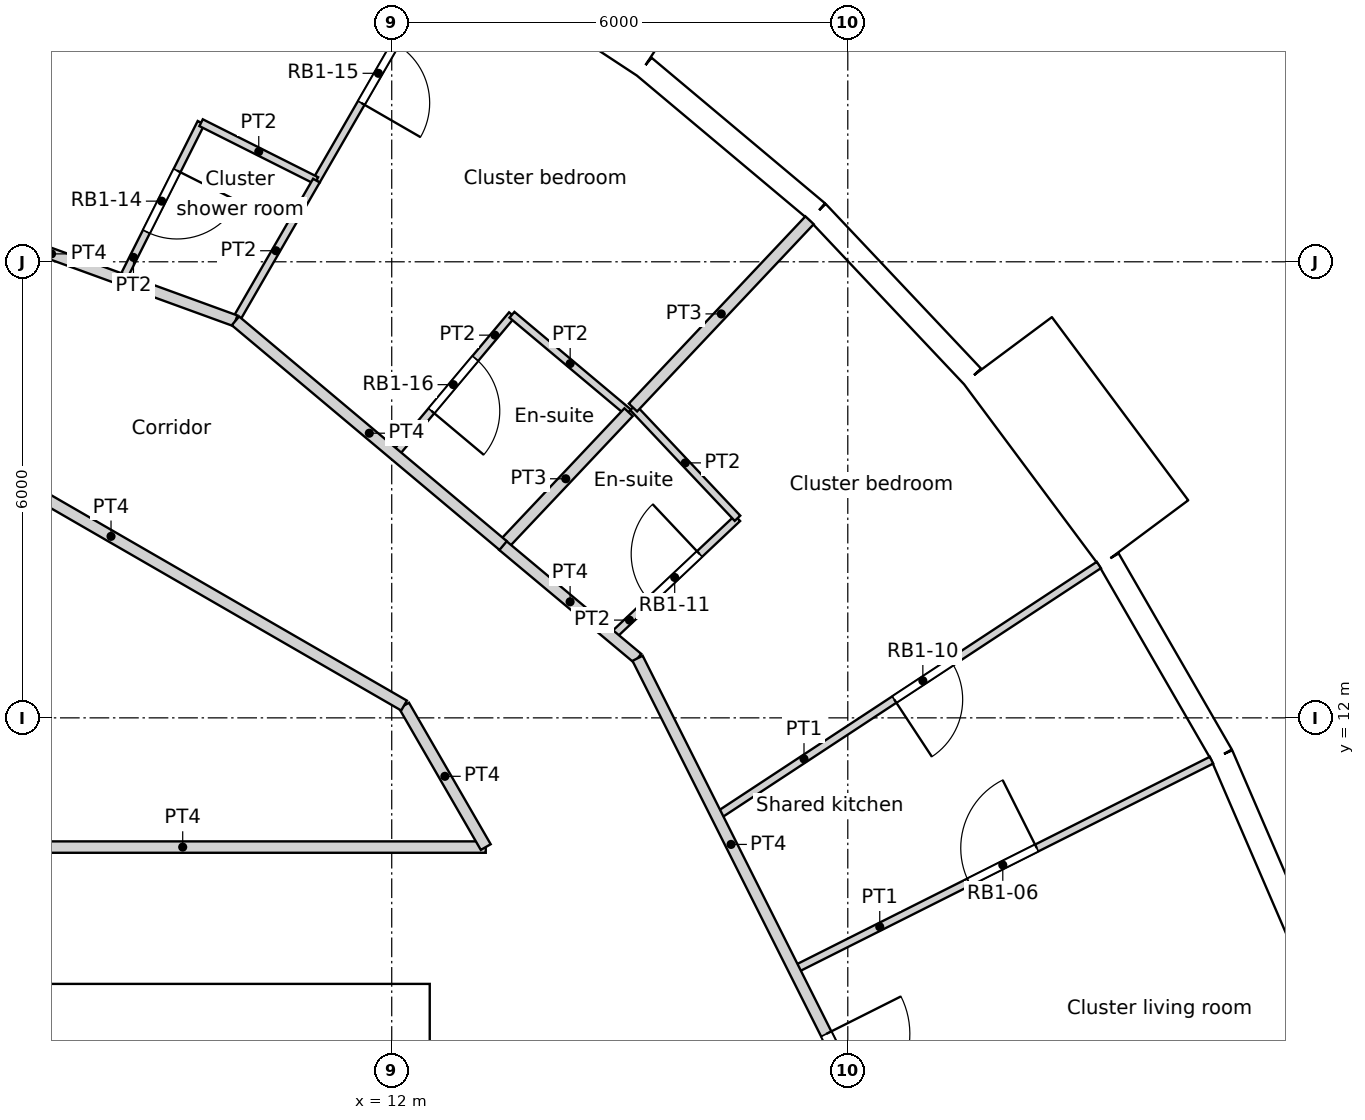
"""IFC4 building model, lengths in metres.
Left out: names, types, materials, properties, quantities, classifications, styles, units other than length and angle.
Written with IfcOpenShell. Run it as: python <this file> out.ifc"""

import sys

from ifc_helpers import new_model, si_unit, direction, frame, frame_2d, origin, origin_2d, place, context, subcontext, project, spatial, rectangle, circle, extrude, element, fill, save


model = new_model("IFC4")
c1 = context("Model", 3, precision=1e-05, world=origin(), true_north=direction((0.0, 1.0)))
c2 = subcontext(c1, "Body", "Model", "MODEL_VIEW")
j1 = project(units=[si_unit("LENGTHUNIT", "METRE"), si_unit("PLANEANGLEUNIT", "RADIAN")], contexts=[c1])
p1 = place(None, origin())
s1 = spatial("IfcSite", under=j1, at=p1, CompositionType="ELEMENT")
p2 = place(p1, origin())
s2 = spatial("IfcBuilding", under=s1, at=p2, CompositionType="ELEMENT")
p3 = place(p2, frame((0.0, 0.0, 126.0)))
s3 = spatial("IfcBuildingStorey", under=s2, at=p3, CompositionType="ELEMENT", Elevation=126.0)
for number, where, z_axis, x_axis in (
    (1, (21.937, 11.017, 0.0), (0.0, 0.0, 1.0), (1.0, 0.0, 0.0)),
    (2, (18.805, 15.779, 0.0), (0.0, 0.0, 1.0), (1.0, 0.0, 0.0)),
    (3, (14.659, 19.69, 0.0), (0.0, 0.0, 1.0), (1.0, 0.0, 0.0)),
):
    element("IfcColumn", number, at=place(p3, frame(where, z_axis=z_axis, x_axis=x_axis)), inside=s3, PredefinedType="COLUMN", context=c2, shape_type="SweptSolid", body=[
        extrude(circle(Radius=0.6, at=origin_2d()), origin(), (0.0, 0.0, 1.0), 3.6),
    ])
for number, where, z_axis, x_axis in (
    (4, (15.552, 10.603, 0.0), (0.0, 0.0, 1.0), (1.0, 0.0, 0.0)),
    (5, (11.735, 14.716, 0.0), (0.0, 0.0, 1.0), (1.0, 0.0, 0.0)),
):
    element("IfcColumn", number, at=place(p3, frame(where, z_axis=z_axis, x_axis=x_axis)), inside=s3, PredefinedType="COLUMN", context=c2, shape_type="SweptSolid", body=[
        extrude(circle(Radius=0.65, at=origin_2d()), origin(), (0.0, 0.0, 1.0), 3.6),
    ])
p4 = place(p3, frame((24.097, 8.781, 0.0), z_axis=(0.0, 0.0, 1.0), x_axis=(-0.396078892785, 0.918216483565, 0.0)))
e6 = element("IfcWall", 6, at=p4, inside=s3, PredefinedType="SOLIDWALL", context=c2, shape_type="SweptSolid", body=[
    extrude(rectangle(XDim=2.973, YDim=0.3, at=frame_2d((1.486, 0.0))), origin(), (0.0, 0.0, 1.0), 3.3),
])
p5 = place(p4, frame((1.486, 0.0, 1.55)))
e7 = element("IfcOpeningElement", 7, at=p5, cuts=e6, PredefinedType="OPENING", context=c2, shape_type="SweptSolid", body=[
    extrude(circle(Radius=0.9, at=origin_2d()), frame((0.0, 0.16, 0.0), z_axis=(0.0, -1.0, 0.0), x_axis=(1.0, 0.0, 0.0)), (0.0, 0.0, 1.0), 0.32),
])
p6 = place(p3, frame((22.919, 11.51, 0.0), z_axis=(0.0, 0.0, 1.0), x_axis=(-0.500016263033, 0.866016014115, 0.0)))
e8 = element("IfcWall", 8, at=p6, inside=s3, PredefinedType="SOLIDWALL", context=c2, shape_type="SweptSolid", body=[
    extrude(rectangle(XDim=2.973, YDim=0.3, at=frame_2d((1.487, 0.0))), origin(), (0.0, 0.0, 1.0), 3.3),
])
p7 = place(p6, frame((1.486, 0.0, 1.55)))
e9 = element("IfcOpeningElement", 9, at=p7, cuts=e8, PredefinedType="OPENING", context=c2, shape_type="SweptSolid", body=[
    extrude(circle(Radius=0.9, at=origin_2d()), frame((0.0, 0.16, 0.0), z_axis=(0.0, -1.0, 0.0), x_axis=(1.0, 0.0, 0.0)), (0.0, 0.0, 1.0), 0.32),
])
p8 = place(p3, frame((21.895, 14.43, -0.3), z_axis=(0.0, 0.0, 1.0), x_axis=(-0.597183717734, 0.802104486506, 0.0)))
e10 = element("IfcWall", 10, at=p8, inside=s3, PredefinedType="ELEMENTEDWALL", context=c2, shape_type="SweptSolid", body=[
    extrude(rectangle(XDim=3.0, YDim=1.45, at=frame_2d((1.5, 0.0))), origin(), (0.0, 0.0, 1.0), 3.6),
])
p9 = place(p8, frame((1.5, 0.0, 1.85)))
e11 = element("IfcOpeningElement", 11, at=p9, cuts=e10, PredefinedType="OPENING", context=c2, shape_type="SweptSolid", body=[
    extrude(circle(Radius=0.9, at=origin_2d()), frame((0.0, 0.735, 0.0), z_axis=(0.0, -1.0, 0.0), x_axis=(1.0, 0.0, 0.0)), (0.0, 0.0, 1.0), 1.47),
])
p10 = place(p3, frame((19.64, 16.493, 0.0), z_axis=(0.0, 0.0, 1.0), x_axis=(-0.686235184166, 0.727379730273, 0.0)))
e12 = element("IfcWall", 12, at=p10, inside=s3, PredefinedType="SOLIDWALL", context=c2, shape_type="SweptSolid", body=[
    extrude(rectangle(XDim=2.973, YDim=0.3, at=frame_2d((1.486, 0.0))), origin(), (0.0, 0.0, 1.0), 3.3),
])
p11 = place(p10, frame((1.486, 0.0, 1.55)))
e13 = element("IfcOpeningElement", 13, at=p11, cuts=e12, PredefinedType="OPENING", context=c2, shape_type="SweptSolid", body=[
    extrude(circle(Radius=0.9, at=origin_2d()), frame((0.0, 0.16, 0.0), z_axis=(0.0, -1.0, 0.0), x_axis=(1.0, 0.0, 0.0)), (0.0, 0.0, 1.0), 0.32),
])
p12 = place(p3, frame((17.6, 18.655, 0.0), z_axis=(0.0, 0.0, 1.0), x_axis=(-0.766049350637, 0.642781761089, 0.0)))
e14 = element("IfcWall", 14, at=p12, inside=s3, PredefinedType="SOLIDWALL", context=c2, shape_type="SweptSolid", body=[
    extrude(rectangle(XDim=2.973, YDim=0.3, at=frame_2d((1.486, 0.0))), origin(), (0.0, 0.0, 1.0), 3.3),
])
p13 = place(p12, frame((1.486, 0.0, 1.55)))
e15 = element("IfcOpeningElement", 15, at=p13, cuts=e14, PredefinedType="OPENING", context=c2, shape_type="SweptSolid", body=[
    extrude(circle(Radius=0.9, at=origin_2d()), frame((0.0, 0.16, 0.0), z_axis=(0.0, -1.0, 0.0), x_axis=(1.0, 0.0, 0.0)), (0.0, 0.0, 1.0), 0.32),
])
p14 = place(p3, frame((15.639, 21.048, -0.3), z_axis=(0.0, 0.0, 1.0), x_axis=(-0.835514416706, 0.549468524554, 0.0)))
e16 = element("IfcWall", 16, at=p14, inside=s3, PredefinedType="ELEMENTEDWALL", context=c2, shape_type="SweptSolid", body=[
    extrude(rectangle(XDim=3.0, YDim=1.45, at=frame_2d((1.5, 0.0))), origin(), (0.0, 0.0, 1.0), 3.6),
])
p15 = place(p14, frame((1.5, 0.0, 1.85)))
e17 = element("IfcOpeningElement", 17, at=p15, cuts=e16, PredefinedType="OPENING", context=c2, shape_type="SweptSolid", body=[
    extrude(circle(Radius=0.9, at=origin_2d()), frame((0.0, 0.735, 0.0), z_axis=(0.0, -1.0, 0.0), x_axis=(1.0, 0.0, 0.0)), (0.0, 0.0, 1.0), 1.47),
])
p16 = place(p3, frame((24.677, 19.415, 0.0), z_axis=(0.0, 0.0, 1.0), x_axis=(-0.654818024412, 0.755786580263, 0.0)))
e18 = element("IfcWall", 18, at=p16, inside=s3, PredefinedType="PARAPET", context=c2, shape_type="SweptSolid", body=[
    extrude(rectangle(XDim=2.974, YDim=0.25, at=frame_2d((1.487, 0.0))), origin(), (0.0, 0.0, 1.0), 1.1),
])
p17 = place(p3, frame((-12.5, 8.05, 0.0), z_axis=(0.0, 0.0, 1.0), x_axis=(1.0, 0.0, 0.0)))
e19 = element("IfcWall", 19, at=p17, inside=s3, PredefinedType="SOLIDWALL", context=c2, shape_type="SweptSolid", body=[
    extrude(rectangle(XDim=25.0, YDim=0.9, at=frame_2d((12.5, 0.0))), origin(), (0.0, 0.0, 1.0), 3.6),
])
p18 = place(p17, frame((8.3, 0.0, 0.0)))
e20 = element("IfcOpeningElement", 20, at=p18, cuts=e19, PredefinedType="OPENING", context=c2, shape_type="SweptSolid", body=[
    extrude(rectangle(XDim=1.8, YDim=2.1, at=frame_2d((0.9, 1.05))), frame((0.0, 0.45, 0.0), z_axis=(0.0, -1.0, 0.0), x_axis=(1.0, 0.0, 0.0)), (0.0, 0.0, 1.0), 0.9),
])
p19 = place(p3, frame((-3.025, 10.3, 0.0), z_axis=(0.0, 0.0, 1.0), x_axis=(1.0, 0.0, 0.0)))
e21 = element("IfcWall", 21, at=p19, inside=s3, PredefinedType="PARTITIONING", context=c2, shape_type="SweptSolid", body=[
    extrude(rectangle(XDim=16.262, YDim=0.15, at=frame_2d((8.131, 0.0))), origin(), (0.0, 0.0, 1.0), 3.3),
])
p20 = place(p19, frame((7.288, 0.0, 0.0)))
e22 = element("IfcOpeningElement", 22, at=p20, cuts=e21, PredefinedType="OPENING", context=c2, shape_type="SweptSolid", body=[
    extrude(rectangle(XDim=0.95, YDim=2.1, at=frame_2d((0.475, 1.05))), frame((0.0, 0.075, 0.0), z_axis=(0.0, -1.0, 0.0), x_axis=(1.0, 0.0, 0.0)), (0.0, 0.0, 1.0), 0.15),
])
p21 = place(p3, frame((12.162, 12.162, 0.0), z_axis=(0.0, 0.0, 1.0), x_axis=(0.499961633463, -0.866047553582, 0.0)))
e23 = element("IfcWall", 23, at=p21, inside=s3, PredefinedType="PARTITIONING", context=c2, shape_type="SweptSolid", body=[
    extrude(rectangle(XDim=2.15, YDim=0.15, at=frame_2d((1.075, 0.0))), origin(), (0.0, 0.0, 1.0), 3.3),
])
p22 = place(p3, frame((15.235, 12.784, 0.0), z_axis=(0.0, 0.0, 1.0), x_axis=(0.448809691484, -0.893627361281, 0.0)))
e24 = element("IfcWall", 24, at=p22, inside=s3, PredefinedType="PARTITIONING", context=c2, shape_type="SweptSolid", body=[
    extrude(rectangle(XDim=9.174, YDim=0.15, at=frame_2d((4.587, 0.0))), origin(), (0.0, 0.0, 1.0), 3.3),
])
p23 = place(p22, frame((5.53, 0.0, 0.0)))
e25 = element("IfcOpeningElement", 25, at=p23, cuts=e24, PredefinedType="OPENING", context=c2, shape_type="SweptSolid", body=[
    extrude(rectangle(XDim=1.1, YDim=2.1, at=frame_2d((0.55, 1.05))), frame((0.0, 0.075, 0.0), z_axis=(0.0, -1.0, 0.0), x_axis=(1.0, 0.0, 0.0)), (0.0, 0.0, 1.0), 0.15),
])
p24 = place(p3, frame((13.458, 14.27, 0.0), z_axis=(0.0, 0.0, 1.0), x_axis=(0.767079699321, -0.641551817775, 0.0)))
e26 = element("IfcWall", 26, at=p24, inside=s3, PredefinedType="PARTITIONING", context=c2, shape_type="SweptSolid", body=[
    extrude(rectangle(XDim=2.316, YDim=0.15, at=frame_2d((1.158, 0.0))), origin(), (0.0, 0.0, 1.0), 3.3),
])
p25 = place(p3, frame((4.452, 16.614, 0.0), z_axis=(0.0, 0.0, 1.0), x_axis=(0.866005203721, -0.500034985904, 0.0)))
e27 = element("IfcWall", 27, at=p25, inside=s3, PredefinedType="PARTITIONING", context=c2, shape_type="SweptSolid", body=[
    extrude(rectangle(XDim=8.903, YDim=0.15, at=frame_2d((4.452, 0.0))), origin(), (0.0, 0.0, 1.0), 3.3),
])
p26 = place(p3, frame((3.453, 19.586, 0.0), z_axis=(0.0, 0.0, 1.0), x_axis=(0.939706711967, -0.341981425643, 0.0)))
e28 = element("IfcWall", 28, at=p26, inside=s3, PredefinedType="PARTITIONING", context=c2, shape_type="SweptSolid", body=[
    extrude(rectangle(XDim=6.908, YDim=0.15, at=frame_2d((3.454, 0.0))), origin(), (0.0, 0.0, 1.0), 3.3),
])
p27 = place(p26, frame((0.608, 0.0, 0.0)))
e29 = element("IfcOpeningElement", 29, at=p27, cuts=e28, PredefinedType="OPENING", context=c2, shape_type="SweptSolid", body=[
    extrude(rectangle(XDim=1.1, YDim=2.1, at=frame_2d((0.55, 1.05))), frame((0.0, 0.075, 0.0), z_axis=(0.0, -1.0, 0.0), x_axis=(1.0, 0.0, 0.0)), (0.0, 0.0, 1.0), 0.15),
])
p28 = place(p3, frame((9.944, 17.223, 0.0), z_axis=(0.0, 0.0, 1.0), x_axis=(0.765940168638, -0.642911858708, 0.0)))
e30 = element("IfcWall", 30, at=p28, inside=s3, PredefinedType="PARTITIONING", context=c2, shape_type="SweptSolid", body=[
    extrude(rectangle(XDim=4.598, YDim=0.15, at=frame_2d((2.299, 0.0))), origin(), (0.0, 0.0, 1.0), 3.3),
])
p29 = place(p3, frame((17.293, 8.685, 0.0), z_axis=(0.0, 0.0, 1.0), x_axis=(0.893639230217, 0.448786058403, 0.0)))
e31 = element("IfcWall", 31, at=p29, inside=s3, PredefinedType="PARTITIONING", context=c2, shape_type="SweptSolid", body=[
    extrude(rectangle(XDim=6.146, YDim=0.1, at=frame_2d((3.073, 0.0))), origin(), (0.0, 0.0, 1.0), 3.3),
])
p30 = place(p29, frame((2.573, 0.0, 0.0)))
e32 = element("IfcOpeningElement", 32, at=p30, cuts=e31, PredefinedType="OPENING", context=c2, shape_type="SweptSolid", body=[
    extrude(rectangle(XDim=1.0, YDim=2.04, at=frame_2d((0.5, 1.02))), frame((0.0, 0.05, 0.0), z_axis=(0.0, -1.0, 0.0), x_axis=(1.0, 0.0, 0.0)), (0.0, 0.0, 1.0), 0.1),
])
p31 = place(p3, frame((16.278, 10.706, 0.0), z_axis=(0.0, 0.0, 1.0), x_axis=(0.835487706207, 0.549509138029, 0.0)))
e33 = element("IfcWall", 33, at=p31, inside=s3, PredefinedType="PARTITIONING", context=c2, shape_type="SweptSolid", body=[
    extrude(rectangle(XDim=6.014, YDim=0.1, at=frame_2d((3.007, 0.0))), origin(), (0.0, 0.0, 1.0), 3.3),
])
p32 = place(p31, frame((2.793, 0.0, 0.0)))
e34 = element("IfcOpeningElement", 34, at=p32, cuts=e33, PredefinedType="OPENING", context=c2, shape_type="SweptSolid", body=[
    extrude(rectangle(XDim=0.9, YDim=2.1, at=frame_2d((0.45, 1.05))), frame((0.0, 0.05, 0.0), z_axis=(0.0, -1.0, 0.0), x_axis=(1.0, 0.0, 0.0)), (0.0, 0.0, 1.0), 0.1),
])
p33 = place(p3, frame((14.896, 13.068, 0.0), z_axis=(0.0, 0.0, 1.0), x_axis=(0.727754926423, 0.68583727448, 0.0)))
e35 = element("IfcWall", 35, at=p33, inside=s3, PredefinedType="PARTITIONING", context=c2, shape_type="SweptSolid", body=[
    extrude(rectangle(XDim=2.271, YDim=0.1, at=frame_2d((1.136, 0.0))), origin(), (0.0, 0.0, 1.0), 3.3),
])
p34 = place(p33, frame((0.686, 0.0, 0.0)))
e36 = element("IfcOpeningElement", 36, at=p34, cuts=e35, PredefinedType="OPENING", context=c2, shape_type="SweptSolid", body=[
    extrude(rectangle(XDim=0.9, YDim=2.04, at=frame_2d((0.45, 1.02))), frame((0.0, 0.05, 0.0), z_axis=(0.0, -1.0, 0.0), x_axis=(1.0, 0.0, 0.0)), (0.0, 0.0, 1.0), 0.1),
])
p35 = place(p3, frame((15.174, 16.083, 0.0), z_axis=(0.0, 0.0, 1.0), x_axis=(0.686337209023, -0.727283462971, 0.0)))
e37 = element("IfcWall", 37, at=p35, inside=s3, PredefinedType="PARTITIONING", context=c2, shape_type="SweptSolid", body=[
    extrude(rectangle(XDim=2.003, YDim=0.1, at=frame_2d((1.002, 0.0))), origin(), (0.0, 0.0, 1.0), 3.3),
])
p36 = place(p3, frame((15.174, 16.083, 0.0), z_axis=(0.0, 0.0, 1.0), x_axis=(0.686144834043, 0.727464959099, 0.0)))
e38 = element("IfcWall", 38, at=p36, inside=s3, PredefinedType="PARTITIONING", context=c2, shape_type="SweptSolid", body=[
    extrude(rectangle(XDim=3.385, YDim=0.15, at=frame_2d((1.693, 0.0))), origin(), (0.0, 0.0, 1.0), 3.3),
])
p37 = place(p3, frame((13.463, 14.27, 0.0), z_axis=(0.0, 0.0, 1.0), x_axis=(0.686486574862, 0.727142477465, 0.0)))
e39 = element("IfcWall", 39, at=p37, inside=s3, PredefinedType="PARTITIONING", context=c2, shape_type="SweptSolid", body=[
    extrude(rectangle(XDim=2.408, YDim=0.15, at=frame_2d((1.204, 0.0))), origin(), (0.0, 0.0, 1.0), 3.3),
])
p38 = place(p3, frame((9.492, 19.83, 0.0), z_axis=(0.0, 0.0, 1.0), x_axis=(0.893620418257, -0.44882351551, 0.0)))
e40 = element("IfcWall", 40, at=p38, inside=s3, PredefinedType="PARTITIONING", context=c2, shape_type="SweptSolid", body=[
    extrude(rectangle(XDim=1.698, YDim=0.1, at=frame_2d((0.849, 0.0))), origin(), (0.0, 0.0, 1.0), 3.3),
])
p39 = place(p3, frame((8.455, 17.765, 0.0), z_axis=(0.0, 0.0, 1.0), x_axis=(0.448692072555, 0.893686423768, 0.0)))
e41 = element("IfcWall", 41, at=p39, inside=s3, PredefinedType="PARTITIONING", context=c2, shape_type="SweptSolid", body=[
    extrude(rectangle(XDim=2.311, YDim=0.1, at=frame_2d((1.155, 0.0))), origin(), (0.0, 0.0, 1.0), 3.3),
])
p40 = place(p39, frame((0.706, 0.0, 0.0)))
e42 = element("IfcOpeningElement", 42, at=p40, cuts=e41, PredefinedType="OPENING", context=c2, shape_type="SweptSolid", body=[
    extrude(rectangle(XDim=0.9, YDim=2.0, at=frame_2d((0.45, 1.0))), frame((0.0, 0.05, 0.0), z_axis=(0.0, -1.0, 0.0), x_axis=(1.0, 0.0, 0.0)), (0.0, 0.0, 1.0), 0.1),
])
p41 = place(p3, frame((11.009, 19.068, 0.0), z_axis=(0.0, 0.0, 1.0), x_axis=(0.500101058546, 0.865967049743, 0.0)))
e43 = element("IfcWall", 43, at=p41, inside=s3, PredefinedType="PARTITIONING", context=c2, shape_type="SweptSolid", body=[
    extrude(rectangle(XDim=3.479, YDim=0.1, at=frame_2d((1.74, 0.0))), origin(), (0.0, 0.0, 1.0), 3.3),
])
p42 = place(p41, frame((1.18, 0.0, 0.0)))
e44 = element("IfcOpeningElement", 44, at=p42, cuts=e43, PredefinedType="OPENING", context=c2, shape_type="SweptSolid", body=[
    extrude(rectangle(XDim=0.9, YDim=2.1, at=frame_2d((0.45, 1.05))), frame((0.0, 0.05, 0.0), z_axis=(0.0, -1.0, 0.0), x_axis=(1.0, 0.0, 0.0)), (0.0, 0.0, 1.0), 0.1),
])
p43 = place(p3, frame((9.944, 17.223, 0.0), z_axis=(0.0, 0.0, 1.0), x_axis=(0.499861334108, 0.866105447774, 0.0)))
e45 = element("IfcWall", 45, at=p43, inside=s3, PredefinedType="PARTITIONING", context=c2, shape_type="SweptSolid", body=[
    extrude(rectangle(XDim=2.13, YDim=0.1, at=frame_2d((1.065, 0.0))), origin(), (0.0, 0.0, 1.0), 3.3),
])
p44 = place(p3, frame((13.582, 17.303, 0.0), z_axis=(0.0, 0.0, 1.0), x_axis=(0.766224532916, -0.642572925945, 0.0)))
e46 = element("IfcWall", 46, at=p44, inside=s3, PredefinedType="PARTITIONING", context=c2, shape_type="SweptSolid", body=[
    extrude(rectangle(XDim=1.998, YDim=0.1, at=frame_2d((0.999, 0.0))), origin(), (0.0, 0.0, 1.0), 3.3),
])
p45 = place(p3, frame((12.04, 15.465, 0.0), z_axis=(0.0, 0.0, 1.0), x_axis=(0.642743296644, 0.766081623993, 0.0)))
e47 = element("IfcWall", 47, at=p45, inside=s3, PredefinedType="PARTITIONING", context=c2, shape_type="SweptSolid", body=[
    extrude(rectangle(XDim=2.399, YDim=0.1, at=frame_2d((1.2, 0.0))), origin(), (0.0, 0.0, 1.0), 3.3),
])
p46 = place(p45, frame((0.749, 0.0, 0.0)))
e48 = element("IfcOpeningElement", 48, at=p46, cuts=e47, PredefinedType="OPENING", context=c2, shape_type="SweptSolid", body=[
    extrude(rectangle(XDim=0.9, YDim=2.04, at=frame_2d((0.45, 1.02))), frame((0.0, 0.05, 0.0), z_axis=(0.0, -1.0, 0.0), x_axis=(1.0, 0.0, 0.0)), (0.0, 0.0, 1.0), 0.1),
])
p47 = place(p5, origin())
e49 = element("IfcWindow", 49, at=p47, inside=s3, PartitioningType="SINGLE_PANEL", PredefinedType="WINDOW", context=c2, shape_type="SweptSolid", body=[
    extrude(circle(Radius=0.9, at=origin_2d()), frame((0.0, 0.12, 0.0), z_axis=(0.0, -1.0, 0.0), x_axis=(1.0, 0.0, 0.0)), (0.0, 0.0, 1.0), 0.1),
])
fill(e7, e49)
p48 = place(p7, origin())
e50 = element("IfcWindow", 50, at=p48, inside=s3, PartitioningType="SINGLE_PANEL", PredefinedType="WINDOW", context=c2, shape_type="SweptSolid", body=[
    extrude(circle(Radius=0.9, at=origin_2d()), frame((0.0, 0.12, 0.0), z_axis=(0.0, -1.0, 0.0), x_axis=(1.0, 0.0, 0.0)), (0.0, 0.0, 1.0), 0.1),
])
fill(e9, e50)
p49 = place(p9, origin())
e51 = element("IfcWindow", 51, at=p49, inside=s3, PartitioningType="SINGLE_PANEL", PredefinedType="WINDOW", context=c2, shape_type="SweptSolid", body=[
    extrude(circle(Radius=0.9, at=origin_2d()), frame((0.0, 0.695, 0.0), z_axis=(0.0, -1.0, 0.0), x_axis=(1.0, 0.0, 0.0)), (0.0, 0.0, 1.0), 0.1),
])
fill(e11, e51)
p50 = place(p11, origin())
e52 = element("IfcWindow", 52, at=p50, inside=s3, PartitioningType="SINGLE_PANEL", PredefinedType="WINDOW", context=c2, shape_type="SweptSolid", body=[
    extrude(circle(Radius=0.9, at=origin_2d()), frame((0.0, 0.12, 0.0), z_axis=(0.0, -1.0, 0.0), x_axis=(1.0, 0.0, 0.0)), (0.0, 0.0, 1.0), 0.1),
])
fill(e13, e52)
p51 = place(p13, origin())
e53 = element("IfcWindow", 53, at=p51, inside=s3, PartitioningType="SINGLE_PANEL", PredefinedType="WINDOW", context=c2, shape_type="SweptSolid", body=[
    extrude(circle(Radius=0.9, at=origin_2d()), frame((0.0, 0.12, 0.0), z_axis=(0.0, -1.0, 0.0), x_axis=(1.0, 0.0, 0.0)), (0.0, 0.0, 1.0), 0.1),
])
fill(e15, e53)
p52 = place(p23, origin())
e54 = element("IfcDoor", 54, at=p52, inside=s3, OperationType="SINGLE_SWING_LEFT", PredefinedType="DOOR", context=c2, shape_type="SweptSolid", body=[
    extrude(rectangle(XDim=1.1, YDim=2.1, at=frame_2d((0.55, 1.05))), frame((0.0, 0.025, 0.0), z_axis=(0.0, -1.0, 0.0), x_axis=(1.0, 0.0, 0.0)), (0.0, 0.0, 1.0), 0.05),
])
fill(e25, e54)
p53 = place(p30, origin())
e55 = element("IfcDoor", 55, at=p53, inside=s3, OperationType="SINGLE_SWING_RIGHT", PredefinedType="DOOR", context=c2, shape_type="SweptSolid", body=[
    extrude(rectangle(XDim=1.0, YDim=2.04, at=frame_2d((0.5, 1.02))), frame((0.0, 0.025, 0.0), z_axis=(0.0, -1.0, 0.0), x_axis=(1.0, 0.0, 0.0)), (0.0, 0.0, 1.0), 0.05),
])
fill(e32, e55)
p54 = place(p32, origin())
e56 = element("IfcDoor", 56, at=p54, inside=s3, OperationType="SINGLE_SWING_RIGHT", PredefinedType="DOOR", context=c2, shape_type="SweptSolid", body=[
    extrude(rectangle(XDim=0.9, YDim=2.1, at=frame_2d((0.45, 1.05))), frame((0.0, 0.025, 0.0), z_axis=(0.0, -1.0, 0.0), x_axis=(1.0, 0.0, 0.0)), (0.0, 0.0, 1.0), 0.05),
])
fill(e34, e56)
p55 = place(p34, origin())
e57 = element("IfcDoor", 57, at=p55, inside=s3, OperationType="SINGLE_SWING_RIGHT", PredefinedType="DOOR", context=c2, shape_type="SweptSolid", body=[
    extrude(rectangle(XDim=0.9, YDim=2.04, at=frame_2d((0.45, 1.02))), frame((0.0, 0.025, 0.0), z_axis=(0.0, -1.0, 0.0), x_axis=(1.0, 0.0, 0.0)), (0.0, 0.0, 1.0), 0.05),
])
fill(e36, e57)
p56 = place(p40, origin())
e58 = element("IfcDoor", 58, at=p56, inside=s3, OperationType="SINGLE_SWING_LEFT", PredefinedType="DOOR", context=c2, shape_type="SweptSolid", body=[
    extrude(rectangle(XDim=0.9, YDim=2.0, at=frame_2d((0.45, 1.0))), frame((0.0, 0.025, 0.0), z_axis=(0.0, -1.0, 0.0), x_axis=(1.0, 0.0, 0.0)), (0.0, 0.0, 1.0), 0.05),
])
fill(e42, e58)
p57 = place(p42, origin())
e59 = element("IfcDoor", 59, at=p57, inside=s3, OperationType="SINGLE_SWING_RIGHT", PredefinedType="DOOR", context=c2, shape_type="SweptSolid", body=[
    extrude(rectangle(XDim=0.9, YDim=2.1, at=frame_2d((0.45, 1.05))), frame((0.0, 0.025, 0.0), z_axis=(0.0, -1.0, 0.0), x_axis=(1.0, 0.0, 0.0)), (0.0, 0.0, 1.0), 0.05),
])
fill(e44, e59)
p58 = place(p46, origin())
e60 = element("IfcDoor", 60, at=p58, inside=s3, OperationType="SINGLE_SWING_RIGHT", PredefinedType="DOOR", context=c2, shape_type="SweptSolid", body=[
    extrude(rectangle(XDim=0.9, YDim=2.04, at=frame_2d((0.45, 1.02))), frame((0.0, 0.025, 0.0), z_axis=(0.0, -1.0, 0.0), x_axis=(1.0, 0.0, 0.0)), (0.0, 0.0, 1.0), 0.05),
])
fill(e48, e60)
save(model, sys.argv[1])
